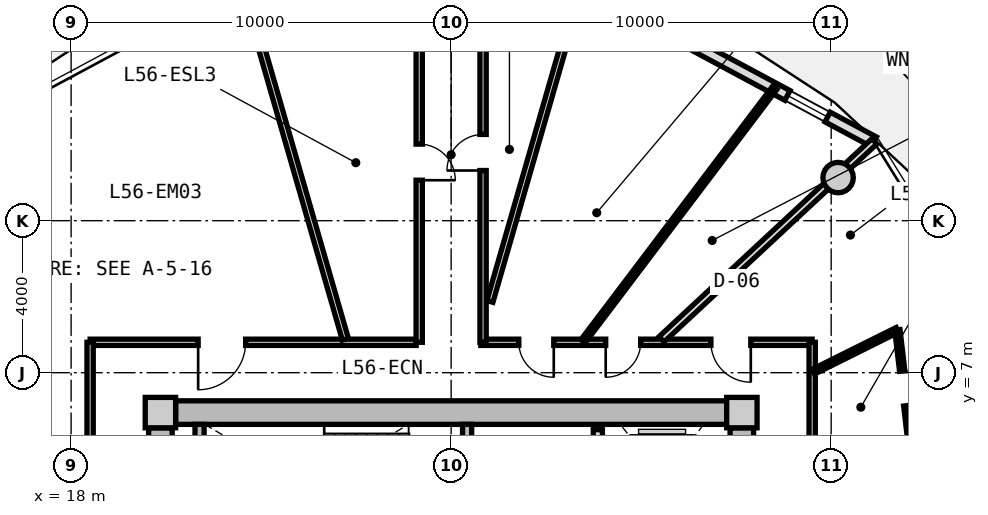
"""IFC4 building model, lengths in metres.
Left out: names, types, materials, properties, quantities, classifications, styles, units other than length and angle.
Written with IfcOpenShell. Run it as: python <this file> out.ifc"""

import sys

from ifc_helpers import new_model, si_unit, direction, frame, frame_2d, origin, origin_2d, place, context, subcontext, project, spatial, rectangle, circle, extrude, source, transform, mapped, element, fill, save


model = new_model("IFC4")
c1 = context("Model", 3, precision=1e-05, world=origin(), true_north=direction((0.0, 1.0)))
c2 = subcontext(c1, "Body", "Model", "MODEL_VIEW")
j1 = project(units=[si_unit("LENGTHUNIT", "METRE"), si_unit("PLANEANGLEUNIT", "RADIAN")], contexts=[c1])
p1 = place(None, origin())
s1 = spatial("IfcSite", under=j1, at=p1, CompositionType="ELEMENT")
p2 = place(p1, origin())
s2 = spatial("IfcBuilding", under=s1, at=p2, CompositionType="ELEMENT")
p3 = place(p2, frame((0.0, 0.0, 180.05)))
s3 = spatial("IfcBuildingStorey", under=s2, at=p3, CompositionType="ELEMENT", Elevation=180.05)
m1 = source(origin(), c2, "Body", "SweptSolid", [
    extrude(rectangle(XDim=0.8, YDim=0.8, at=origin_2d()), origin(), (0.0, 0.0, 1.0), 3.05),
])
for number, where, z_axis, x_axis in (
    (1, (35.65, 5.95, 0.0), (0.0, 0.0, 1.0), (1.0, 0.0, 0.0)),
    (2, (20.35, 5.95, 0.0), (0.0, 0.0, 1.0), (1.0, 0.0, 0.0)),
):
    element("IfcColumn", number, at=place(p3, frame(where, z_axis=z_axis, x_axis=x_axis)), inside=s3, PredefinedType="COLUMN", context=c2, shape_type="MappedRepresentation", body=[
        mapped(m1, transform((0.0, 0.0, 0.0), x_axis=(1.0, 0.0, 0.0), y_axis=(0.0, 1.0, 0.0), z_axis=(0.0, 0.0, 1.0), scale=1.0)),
    ])
m2 = source(origin(), c2, "Body", "SweptSolid", [
    extrude(rectangle(XDim=14.5, YDim=0.62, at=frame_2d((7.25, 0.0))), origin(), (0.0, 0.0, 1.0), 2.81),
])
p4 = place(p3, frame((20.75, 5.95, 0.0), z_axis=(0.0, 0.0, 1.0), x_axis=(1.0, 0.0, 0.0)))
e3 = element("IfcWall", 3, at=p4, inside=s3, PredefinedType="SHEAR", context=c2, shape_type="MappedRepresentation", body=[
    mapped(m2, transform((0.0, 0.0, 0.0), x_axis=(1.0, 0.0, 0.0), y_axis=(0.0, 1.0, 0.0), z_axis=(0.0, 0.0, 1.0), scale=1.0)),
])
m3 = source(origin(), c2, "Body", "SweptSolid", [
    extrude(rectangle(XDim=11.1, YDim=0.62, at=frame_2d((5.55, 0.0))), origin(), (0.0, 0.0, 1.0), 2.81),
])
p5 = place(p3, frame((20.35, -5.55, 0.0), z_axis=(0.0, 0.0, 1.0), x_axis=(0.0, 1.0, 0.0)))
e4 = element("IfcWall", 4, at=p5, inside=s3, PredefinedType="SHEAR", context=c2, shape_type="MappedRepresentation", body=[
    mapped(m3, transform((0.0, 0.0, 0.0), x_axis=(1.0, 0.0, 0.0), y_axis=(0.0, 1.0, 0.0), z_axis=(0.0, 0.0, 1.0), scale=1.0)),
])
p6 = place(p5, frame((3.8, 0.0, 0.0)))
e5 = element("IfcOpeningElement", 5, at=p6, cuts=e4, PredefinedType="OPENING", context=c2, shape_type="SweptSolid", body=[
    extrude(rectangle(XDim=1.2, YDim=2.15, at=frame_2d((0.6, 1.075))), frame((0.0, 0.32, 0.0), z_axis=(0.0, -1.0, 0.0), x_axis=(1.0, 0.0, 0.0)), (0.0, 0.0, 1.0), 0.64),
])
p7 = place(p3, frame((35.65, 5.55, 0.0), z_axis=(0.0, 0.0, 1.0), x_axis=(0.0, -1.0, 0.0)))
e6 = element("IfcWall", 6, at=p7, inside=s3, PredefinedType="SHEAR", context=c2, shape_type="MappedRepresentation", body=[
    mapped(m3, transform((0.0, 0.0, 0.0), x_axis=(1.0, 0.0, 0.0), y_axis=(0.0, 1.0, 0.0), z_axis=(0.0, 0.0, 1.0), scale=1.0)),
])
p8 = place(p7, frame((5.65, 0.0, 0.0)))
e7 = element("IfcOpeningElement", 7, at=p8, cuts=e6, PredefinedType="OPENING", context=c2, shape_type="SweptSolid", body=[
    extrude(rectangle(XDim=1.2, YDim=2.15, at=frame_2d((0.6, 1.075))), frame((0.0, 0.32, 0.0), z_axis=(0.0, -1.0, 0.0), x_axis=(1.0, 0.0, 0.0)), (0.0, 0.0, 1.0), 0.64),
])
m4 = source(origin(), c2, "Body", "SweptSolid", [
    extrude(circle(Radius=0.4, at=origin_2d()), origin(), (0.0, 0.0, 1.0), 3.05),
])
p9 = place(p3, frame((38.183, 12.135, 0.0), z_axis=(0.0, 0.0, 1.0), x_axis=(1.0, 0.0, 0.0)))
e8 = element("IfcColumn", 8, at=p9, inside=s3, PredefinedType="COLUMN", context=c2, shape_type="MappedRepresentation", body=[
    mapped(m4, transform((0.0, 0.0, 0.0), x_axis=(1.0, 0.0, 0.0), y_axis=(0.0, 1.0, 0.0), z_axis=(0.0, 0.0, 1.0), scale=1.0)),
])
m5 = source(origin(), c2, "Body", "SweptSolid", [
    extrude(rectangle(XDim=8.742, YDim=0.29, at=frame_2d((4.371, 0.0))), origin(), (0.0, 0.0, 1.0), 2.81),
])
p10 = place(p3, frame((31.422, 17.211, 0.0), z_axis=(0.0, 0.0, 1.0), x_axis=(0.880992489116, -0.473130250693, 0.0)))
e9 = element("IfcWall", 9, at=p10, inside=s3, PredefinedType="SOLIDWALL", context=c2, shape_type="MappedRepresentation", body=[
    mapped(m5, transform((0.0, 0.0, 0.0), x_axis=(1.0, 0.0, 0.0), y_axis=(0.0, 1.0, 0.0), z_axis=(0.0, 0.0, 1.0), scale=1.0)),
])
p11 = place(p10, frame((0.9, 0.0, 0.0)))
e10 = element("IfcOpeningElement", 10, at=p11, cuts=e9, PredefinedType="OPENING", context=c2, shape_type="SweptSolid", body=[
    extrude(rectangle(XDim=1.15, YDim=2.25, at=frame_2d((0.575, 1.125))), frame((0.0, 0.155, 0.0), z_axis=(0.0, -1.0, 0.0), x_axis=(1.0, 0.0, 0.0)), (0.0, 0.0, 1.0), 0.31),
])
p12 = place(p10, frame((6.161, 0.0, 0.85)))
e11 = element("IfcOpeningElement", 11, at=p12, cuts=e9, PredefinedType="OPENING", context=c2, shape_type="SweptSolid", body=[
    extrude(rectangle(XDim=1.2, YDim=1.5, at=frame_2d((0.6, 0.75))), frame((0.0, 0.155, 0.0), z_axis=(0.0, -1.0, 0.0), x_axis=(1.0, 0.0, 0.0)), (0.0, 0.0, 1.0), 0.31),
])
m6 = source(origin(), c2, "Body", "SweptSolid", [
    extrude(rectangle(XDim=3.19, YDim=0.24, at=frame_2d((1.595, 0.0))), origin(), (0.0, 0.0, 1.0), 2.81),
])
p13 = place(p3, frame((21.38, 2.45, 0.0), z_axis=(0.0, 0.0, 1.0), x_axis=(0.0, 1.0, 0.0)))
e12 = element("IfcWall", 12, at=p13, inside=s3, PredefinedType="PARTITIONING", context=c2, shape_type="MappedRepresentation", body=[
    mapped(m6, transform((0.0, 0.0, 0.0), x_axis=(1.0, 0.0, 0.0), y_axis=(0.0, 1.0, 0.0), z_axis=(0.0, 0.0, 1.0), scale=1.0)),
])
p14 = place(p3, frame((28.42, 2.45, 0.0), z_axis=(0.0, 0.0, 1.0), x_axis=(0.0, 1.0, 0.0)))
e13 = element("IfcWall", 13, at=p14, inside=s3, PredefinedType="PARTITIONING", context=c2, shape_type="MappedRepresentation", body=[
    mapped(m6, transform((0.0, 0.0, 0.0), x_axis=(1.0, 0.0, 0.0), y_axis=(0.0, 1.0, 0.0), z_axis=(0.0, 0.0, 1.0), scale=1.0)),
])
p15 = place(p14, frame((0.55, 0.0, 0.0)))
e14 = element("IfcOpeningElement", 14, at=p15, cuts=e13, PredefinedType="OPENING", context=c2, shape_type="SweptSolid", body=[
    extrude(rectangle(XDim=1.1, YDim=2.15, at=frame_2d((0.55, 1.075))), frame((0.0, 0.13, 0.0), z_axis=(0.0, -1.0, 0.0), x_axis=(1.0, 0.0, 0.0)), (0.0, 0.0, 1.0), 0.26),
])
m7 = source(origin(), c2, "Body", "SweptSolid", [
    extrude(rectangle(XDim=5.0, YDim=0.24, at=frame_2d((2.5, 0.0))), origin(), (0.0, 0.0, 1.0), 2.795),
])
p16 = place(p3, frame((31.86, 0.5, 0.0), z_axis=(0.0, 0.0, 1.0), x_axis=(0.0, 1.0, 0.0)))
e15 = element("IfcWall", 15, at=p16, inside=s3, PredefinedType="PARTITIONING", context=c2, shape_type="MappedRepresentation", body=[
    mapped(m7, transform((0.0, 0.0, 0.0), x_axis=(1.0, 0.0, 0.0), y_axis=(0.0, 1.0, 0.0), z_axis=(0.0, 0.0, 1.0), scale=1.0)),
])
p17 = place(p16, frame((3.05, 0.0, 0.0)))
e16 = element("IfcOpeningElement", 16, at=p17, cuts=e15, PredefinedType="OPENING", context=c2, shape_type="SweptSolid", body=[
    extrude(rectangle(XDim=1.3, YDim=2.2, at=frame_2d((0.65, 1.1))), frame((0.0, 0.13, 0.0), z_axis=(0.0, -1.0, 0.0), x_axis=(1.0, 0.0, 0.0)), (0.0, 0.0, 1.0), 0.26),
])
p18 = place(p16, frame((0.55, 0.0, 0.0)))
e17 = element("IfcOpeningElement", 17, at=p18, cuts=e15, PredefinedType="OPENING", context=c2, shape_type="SweptSolid", body=[
    extrude(rectangle(XDim=1.3, YDim=2.2, at=frame_2d((0.65, 1.1))), frame((0.0, 0.13, 0.0), z_axis=(0.0, -1.0, 0.0), x_axis=(1.0, 0.0, 0.0)), (0.0, 0.0, 1.0), 0.26),
])
m8 = source(origin(), c2, "Body", "SweptSolid", [
    extrude(rectangle(XDim=8.58, YDim=0.165, at=frame_2d((4.29, 0.0))), origin(), (0.0, 0.0, 1.0), 2.795),
])
p19 = place(p3, frame((18.5, 7.8, 0.0), z_axis=(0.0, 0.0, 1.0), x_axis=(1.0, 0.0, 0.0)))
e18 = element("IfcWall", 18, at=p19, inside=s3, PredefinedType="PARTITIONING", context=c2, shape_type="MappedRepresentation", body=[
    mapped(m8, transform((0.0, 0.0, 0.0), x_axis=(1.0, 0.0, 0.0), y_axis=(0.0, 1.0, 0.0), z_axis=(0.0, 0.0, 1.0), scale=1.0)),
])
p20 = place(p19, frame((2.843, 0.0, 0.0)))
e19 = element("IfcOpeningElement", 19, at=p20, cuts=e18, PredefinedType="OPENING", context=c2, shape_type="SweptSolid", body=[
    extrude(rectangle(XDim=1.25, YDim=2.2, at=frame_2d((0.625, 1.1))), frame((0.0, 0.093, 0.0), z_axis=(0.0, -1.0, 0.0), x_axis=(1.0, 0.0, 0.0)), (0.0, 0.0, 1.0), 0.185),
])
m9 = source(origin(), c2, "Body", "SweptSolid", [
    extrude(rectangle(XDim=8.719, YDim=0.165, at=frame_2d((4.36, 0.0))), origin(), (0.0, 0.0, 1.0), 2.795),
])
p21 = place(p3, frame((28.781, 7.8, 0.0), z_axis=(0.0, 0.0, 1.0), x_axis=(1.0, 0.0, 0.0)))
e20 = element("IfcWall", 20, at=p21, inside=s3, PredefinedType="PARTITIONING", context=c2, shape_type="MappedRepresentation", body=[
    mapped(m9, transform((0.0, 0.0, 0.0), x_axis=(1.0, 0.0, 0.0), y_axis=(0.0, 1.0, 0.0), z_axis=(0.0, 0.0, 1.0), scale=1.0)),
])
p22 = place(p21, frame((6.054, 0.0, 0.0)))
e21 = element("IfcOpeningElement", 21, at=p22, cuts=e20, PredefinedType="OPENING", context=c2, shape_type="SweptSolid", body=[
    extrude(rectangle(XDim=1.05, YDim=2.15, at=frame_2d((0.525, 1.075))), frame((0.0, 0.093, 0.0), z_axis=(0.0, -1.0, 0.0), x_axis=(1.0, 0.0, 0.0)), (0.0, 0.0, 1.0), 0.185),
])
p23 = place(p21, frame((3.287, 0.0, 0.0)))
e22 = element("IfcOpeningElement", 22, at=p23, cuts=e20, PredefinedType="OPENING", context=c2, shape_type="SweptSolid", body=[
    extrude(rectangle(XDim=0.92, YDim=2.1, at=frame_2d((0.46, 1.05))), frame((0.0, 0.093, 0.0), z_axis=(0.0, -1.0, 0.0), x_axis=(1.0, 0.0, 0.0)), (0.0, 0.0, 1.0), 0.185),
])
p24 = place(p21, frame((1.0, 0.0, 0.0)))
e23 = element("IfcOpeningElement", 23, at=p24, cuts=e20, PredefinedType="OPENING", context=c2, shape_type="SweptSolid", body=[
    extrude(rectangle(XDim=0.92, YDim=2.1, at=frame_2d((0.46, 1.05))), frame((0.0, 0.093, 0.0), z_axis=(0.0, -1.0, 0.0), x_axis=(1.0, 0.0, 0.0)), (0.0, 0.0, 1.0), 0.185),
])
m10 = source(origin(), c2, "Body", "SweptSolid", [
    extrude(rectangle(XDim=6.88, YDim=0.165, at=frame_2d((3.44, 0.0))), origin(), (0.0, 0.0, 1.0), 2.795),
])
for number, where, z_axis, x_axis in (
    (24, (18.5, 0.92, 0.0), (0.0, 0.0, 1.0), (0.0, 1.0, 0.0)),
    (25, (37.5, 7.8, 0.0), (0.0, 0.0, 1.0), (0.0, -1.0, 0.0)),
):
    element("IfcWall", number, at=place(p3, frame(where, z_axis=z_axis, x_axis=x_axis)), inside=s3, PredefinedType="PARTITIONING", context=c2, shape_type="MappedRepresentation", body=[
        mapped(m10, transform((0.0, 0.0, 0.0), x_axis=(1.0, 0.0, 0.0), y_axis=(0.0, 1.0, 0.0), z_axis=(0.0, 0.0, 1.0), scale=1.0)),
    ])
m11 = source(origin(), c2, "Body", "SweptSolid", [
    extrude(rectangle(XDim=8.695, YDim=0.165, at=frame_2d((4.348, 0.0))), origin(), (0.0, 0.0, 1.0), 2.345),
])
p25 = place(p3, frame((29.02, 8.875, 0.0), z_axis=(0.0, 0.0, 1.0), x_axis=(0.276797231892, 0.960928349263, 0.0)))
e26 = element("IfcWall", 26, at=p25, inside=s3, PredefinedType="PARTITIONING", context=c2, shape_type="MappedRepresentation", body=[
    mapped(m11, transform((0.0, 0.0, 0.0), x_axis=(1.0, 0.0, 0.0), y_axis=(0.0, 1.0, 0.0), z_axis=(0.0, 0.0, 1.0), scale=1.0)),
])
m12 = source(origin(), c2, "Body", "SweptSolid", [
    extrude(rectangle(XDim=9.73, YDim=0.165, at=frame_2d((4.865, 0.0))), origin(), (0.0, 0.0, 1.0), 2.435),
])
p26 = place(p3, frame((25.217, 7.88, 0.0), z_axis=(0.0, 0.0, 1.0), x_axis=(-0.27679492614, 0.960929013436, 0.0)))
e27 = element("IfcWall", 27, at=p26, inside=s3, PredefinedType="PARTITIONING", context=c2, shape_type="MappedRepresentation", body=[
    mapped(m12, transform((0.0, 0.0, 0.0), x_axis=(1.0, 0.0, 0.0), y_axis=(0.0, 1.0, 0.0), z_axis=(0.0, 0.0, 1.0), scale=1.0)),
])
m13 = source(origin(), c2, "Body", "SweptSolid", [
    extrude(rectangle(XDim=8.305, YDim=0.165, at=frame_2d((4.153, 0.0))), origin(), (0.0, 0.0, 1.0), 2.345),
])
p27 = place(p3, frame((18.42, 3.908, 0.0), z_axis=(0.0, 0.0, 1.0), x_axis=(-0.970309994378, 0.241864662175, 0.0)))
e28 = element("IfcWall", 28, at=p27, inside=s3, PredefinedType="PARTITIONING", context=c2, shape_type="MappedRepresentation", body=[
    mapped(m13, transform((0.0, 0.0, 0.0), x_axis=(1.0, 0.0, 0.0), y_axis=(0.0, 1.0, 0.0), z_axis=(0.0, 0.0, 1.0), scale=1.0)),
])
m14 = source(origin(), c2, "Body", "SweptSolid", [
    extrude(rectangle(XDim=6.193, YDim=0.165, at=frame_2d((3.096, 0.0))), origin(), (0.0, 0.0, 1.0), 2.345),
])
p28 = place(p3, frame((37.58, 4.419, 0.0), z_axis=(0.0, 0.0, 1.0), x_axis=(0.970309243466, 0.241867674657, 0.0)))
e29 = element("IfcWall", 29, at=p28, inside=s3, PredefinedType="PARTITIONING", context=c2, shape_type="MappedRepresentation", body=[
    mapped(m14, transform((0.0, 0.0, 0.0), x_axis=(1.0, 0.0, 0.0), y_axis=(0.0, 1.0, 0.0), z_axis=(0.0, 0.0, 1.0), scale=1.0)),
])
m15 = source(origin(), c2, "Body", "SweptSolid", [
    extrude(rectangle(XDim=9.48, YDim=0.165, at=frame_2d((4.74, 0.0))), origin(), (0.0, 0.0, 1.0), 2.795),
])
p29 = place(p3, frame((27.16, 7.8, 0.0), z_axis=(0.0, 0.0, 1.0), x_axis=(0.0, 1.0, 0.0)))
e30 = element("IfcWall", 30, at=p29, inside=s3, PredefinedType="PARTITIONING", context=c2, shape_type="MappedRepresentation", body=[
    mapped(m15, transform((0.0, 0.0, 0.0), x_axis=(1.0, 0.0, 0.0), y_axis=(0.0, 1.0, 0.0), z_axis=(0.0, 0.0, 1.0), scale=1.0)),
])
p30 = place(p29, frame((4.265, 0.0, 0.0)))
e31 = element("IfcOpeningElement", 31, at=p30, cuts=e30, PredefinedType="OPENING", context=c2, shape_type="SweptSolid", body=[
    extrude(rectangle(XDim=0.95, YDim=2.1, at=frame_2d((0.475, 1.05))), frame((0.0, 0.093, 0.0), z_axis=(0.0, -1.0, 0.0), x_axis=(1.0, 0.0, 0.0)), (0.0, 0.0, 1.0), 0.185),
])
p31 = place(p3, frame((28.84, 17.28, 0.0), z_axis=(0.0, 0.0, 1.0), x_axis=(0.0, -1.0, 0.0)))
e32 = element("IfcWall", 32, at=p31, inside=s3, PredefinedType="PARTITIONING", context=c2, shape_type="MappedRepresentation", body=[
    mapped(m15, transform((0.0, 0.0, 0.0), x_axis=(1.0, 0.0, 0.0), y_axis=(0.0, 1.0, 0.0), z_axis=(0.0, 0.0, 1.0), scale=1.0)),
])
p32 = place(p31, frame((4.01, 0.0, 0.0)))
e33 = element("IfcOpeningElement", 33, at=p32, cuts=e32, PredefinedType="OPENING", context=c2, shape_type="SweptSolid", body=[
    extrude(rectangle(XDim=0.95, YDim=2.1, at=frame_2d((0.475, 1.05))), frame((0.0, 0.093, 0.0), z_axis=(0.0, -1.0, 0.0), x_axis=(1.0, 0.0, 0.0)), (0.0, 0.0, 1.0), 0.185),
])
m16 = source(origin(), c2, "Body", "SweptSolid", [
    extrude(rectangle(XDim=7.648, YDim=0.19, at=frame_2d((3.824, 0.0))), origin(), (0.0, 0.0, 1.0), 2.345),
])
p33 = place(p3, frame((33.538, 7.88, 0.0), z_axis=(0.0, 0.0, 1.0), x_axis=(0.732167856666, 0.681124239522, 0.0)))
e34 = element("IfcWall", 34, at=p33, inside=s3, PredefinedType="PARTITIONING", context=c2, shape_type="MappedRepresentation", body=[
    mapped(m16, transform((0.0, 0.0, 0.0), x_axis=(1.0, 0.0, 0.0), y_axis=(0.0, 1.0, 0.0), z_axis=(0.0, 0.0, 1.0), scale=1.0)),
])
m17 = source(origin(), c2, "Body", "SweptSolid", [
    extrude(rectangle(XDim=2.471, YDim=0.14, at=frame_2d((1.235, 0.0))), origin(), (0.0, 0.0, 1.0), 2.795),
])
p34 = place(p3, frame((37.53, 7.026, 0.0), z_axis=(0.0, 0.0, 1.0), x_axis=(0.895295102372, 0.445473545419, 0.0)))
e35 = element("IfcWall", 35, at=p34, inside=s3, PredefinedType="PARTITIONING", context=c2, shape_type="MappedRepresentation", body=[
    mapped(m17, transform((0.0, 0.0, 0.0), x_axis=(1.0, 0.0, 0.0), y_axis=(0.0, 1.0, 0.0), z_axis=(0.0, 0.0, 1.0), scale=1.0)),
])
m18 = source(origin(), c2, "Body", "SweptSolid", [
    extrude(rectangle(XDim=3.101, YDim=0.14, at=frame_2d((1.551, 0.0))), origin(), (0.0, 0.0, 1.0), 2.795),
])
p35 = place(p3, frame((39.742, 8.127, 0.0), z_axis=(0.0, 0.0, 1.0), x_axis=(0.116754457614, -0.993160811061, 0.0)))
e36 = element("IfcWall", 36, at=p35, inside=s3, PredefinedType="PARTITIONING", context=c2, shape_type="MappedRepresentation", body=[
    mapped(m18, transform((0.0, 0.0, 0.0), x_axis=(1.0, 0.0, 0.0), y_axis=(0.0, 1.0, 0.0), z_axis=(0.0, 0.0, 1.0), scale=1.0)),
])
p36 = place(p35, frame((1.09, 0.0, 0.0)))
e37 = element("IfcOpeningElement", 37, at=p36, cuts=e36, PredefinedType="OPENING", context=c2, shape_type="SweptSolid", body=[
    extrude(rectangle(XDim=0.92, YDim=2.1, at=frame_2d((0.46, 1.05))), frame((0.0, 0.08, 0.0), z_axis=(0.0, -1.0, 0.0), x_axis=(1.0, 0.0, 0.0)), (0.0, 0.0, 1.0), 0.16),
])
m19 = source(origin(), c2, "Body", "SweptSolid", [
    extrude(rectangle(XDim=8.359, YDim=0.14, at=frame_2d((4.18, 0.0))), origin(), (0.0, 0.0, 1.0), 2.795),
])
p37 = place(p3, frame((31.473, 7.83, 0.0), z_axis=(0.0, 0.0, 1.0), x_axis=(0.603265985309, 0.797540062297, 0.0)))
e38 = element("IfcWall", 38, at=p37, inside=s3, PredefinedType="PARTITIONING", context=c2, shape_type="MappedRepresentation", body=[
    mapped(m19, transform((0.0, 0.0, 0.0), x_axis=(1.0, 0.0, 0.0), y_axis=(0.0, 1.0, 0.0), z_axis=(0.0, 0.0, 1.0), scale=1.0)),
])
m20 = source(origin(), c2, "Body", "SweptSolid", [
    extrude(rectangle(XDim=1.2, YDim=1.5, at=frame_2d((0.6, 0.75))), frame((0.0, 0.03, 0.0), z_axis=(0.0, -1.0, 0.0), x_axis=(1.0, 0.0, 0.0)), (0.0, 0.0, 1.0), 0.06),
])
p38 = place(p12, origin())
e39 = element("IfcWindow", 39, at=p38, inside=s3, PartitioningType="SINGLE_PANEL", PredefinedType="WINDOW", context=c2, shape_type="MappedRepresentation", body=[
    mapped(m20, transform((0.0, 0.0, 0.0), x_axis=(1.0, 0.0, 0.0), y_axis=(0.0, 1.0, 0.0), z_axis=(0.0, 0.0, 1.0), scale=1.0)),
])
fill(e11, e39)
m21 = source(origin(), c2, "Body", "SweptSolid", [
    extrude(rectangle(XDim=0.95, YDim=2.1, at=frame_2d((0.475, 1.05))), frame((0.0, 0.025, 0.0), z_axis=(0.0, -1.0, 0.0), x_axis=(1.0, 0.0, 0.0)), (0.0, 0.0, 1.0), 0.05),
])
p39 = place(p30, frame((0.95, 0.0, 0.0), z_axis=(0.0, 0.0, 1.0), x_axis=(-1.0, 0.0, 0.0)))
e40 = element("IfcDoor", 40, at=p39, inside=s3, OperationType="SINGLE_SWING_RIGHT", PredefinedType="DOOR", context=c2, shape_type="MappedRepresentation", body=[
    mapped(m21, transform((0.0, 0.0, 0.0), x_axis=(1.0, 0.0, 0.0), y_axis=(0.0, 1.0, 0.0), z_axis=(0.0, 0.0, 1.0), scale=1.0)),
])
fill(e31, e40)
p40 = place(p32, frame((0.95, 0.0, 0.0), z_axis=(0.0, 0.0, 1.0), x_axis=(-1.0, 0.0, 0.0)))
e41 = element("IfcDoor", 41, at=p40, inside=s3, OperationType="SINGLE_SWING_LEFT", PredefinedType="DOOR", context=c2, shape_type="MappedRepresentation", body=[
    mapped(m21, transform((0.0, 0.0, 0.0), x_axis=(1.0, 0.0, 0.0), y_axis=(0.0, 1.0, 0.0), z_axis=(0.0, 0.0, 1.0), scale=1.0)),
])
fill(e33, e41)
m22 = source(origin(), c2, "Body", "SweptSolid", [
    extrude(rectangle(XDim=1.05, YDim=2.15, at=frame_2d((0.525, 1.075))), frame((0.0, 0.025, 0.0), z_axis=(0.0, -1.0, 0.0), x_axis=(1.0, 0.0, 0.0)), (0.0, 0.0, 1.0), 0.05),
])
p41 = place(p22, frame((1.05, 0.0, 0.0), z_axis=(0.0, 0.0, 1.0), x_axis=(-1.0, 0.0, 0.0)))
e42 = element("IfcDoor", 42, at=p41, inside=s3, OperationType="SINGLE_SWING_LEFT", PredefinedType="DOOR", context=c2, shape_type="MappedRepresentation", body=[
    mapped(m22, transform((0.0, 0.0, 0.0), x_axis=(1.0, 0.0, 0.0), y_axis=(0.0, 1.0, 0.0), z_axis=(0.0, 0.0, 1.0), scale=1.0)),
])
fill(e21, e42)
m23 = source(origin(), c2, "Body", "SweptSolid", [
    extrude(rectangle(XDim=0.92, YDim=2.1, at=frame_2d((0.46, 1.05))), frame((0.0, 0.025, 0.0), z_axis=(0.0, -1.0, 0.0), x_axis=(1.0, 0.0, 0.0)), (0.0, 0.0, 1.0), 0.05),
])
p42 = place(p36, origin())
e43 = element("IfcDoor", 43, at=p42, inside=s3, OperationType="SINGLE_SWING_RIGHT", PredefinedType="DOOR", context=c2, shape_type="MappedRepresentation", body=[
    mapped(m23, transform((0.0, 0.0, 0.0), x_axis=(1.0, 0.0, 0.0), y_axis=(0.0, 1.0, 0.0), z_axis=(0.0, 0.0, 1.0), scale=1.0)),
])
fill(e37, e43)
p43 = place(p23, frame((0.92, 0.0, 0.0), z_axis=(0.0, 0.0, 1.0), x_axis=(-1.0, 0.0, 0.0)))
e44 = element("IfcDoor", 44, at=p43, inside=s3, OperationType="SINGLE_SWING_RIGHT", PredefinedType="DOOR", context=c2, shape_type="MappedRepresentation", body=[
    mapped(m23, transform((0.0, 0.0, 0.0), x_axis=(1.0, 0.0, 0.0), y_axis=(0.0, 1.0, 0.0), z_axis=(0.0, 0.0, 1.0), scale=1.0)),
])
fill(e22, e44)
p44 = place(p24, frame((0.92, 0.0, 0.0), z_axis=(0.0, 0.0, 1.0), x_axis=(-1.0, 0.0, 0.0)))
e45 = element("IfcDoor", 45, at=p44, inside=s3, OperationType="SINGLE_SWING_LEFT", PredefinedType="DOOR", context=c2, shape_type="MappedRepresentation", body=[
    mapped(m23, transform((0.0, 0.0, 0.0), x_axis=(1.0, 0.0, 0.0), y_axis=(0.0, 1.0, 0.0), z_axis=(0.0, 0.0, 1.0), scale=1.0)),
])
fill(e23, e45)
m24 = source(origin(), c2, "Body", "SweptSolid", [
    extrude(rectangle(XDim=1.25, YDim=2.2, at=frame_2d((0.625, 1.1))), frame((0.0, 0.025, 0.0), z_axis=(0.0, -1.0, 0.0), x_axis=(1.0, 0.0, 0.0)), (0.0, 0.0, 1.0), 0.05),
])
p45 = place(p20, frame((1.25, 0.0, 0.0), z_axis=(0.0, 0.0, 1.0), x_axis=(-1.0, 0.0, 0.0)))
e46 = element("IfcDoor", 46, at=p45, inside=s3, OperationType="SINGLE_SWING_RIGHT", PredefinedType="DOOR", context=c2, shape_type="MappedRepresentation", body=[
    mapped(m24, transform((0.0, 0.0, 0.0), x_axis=(1.0, 0.0, 0.0), y_axis=(0.0, 1.0, 0.0), z_axis=(0.0, 0.0, 1.0), scale=1.0)),
])
fill(e19, e46)
save(model, sys.argv[1])
